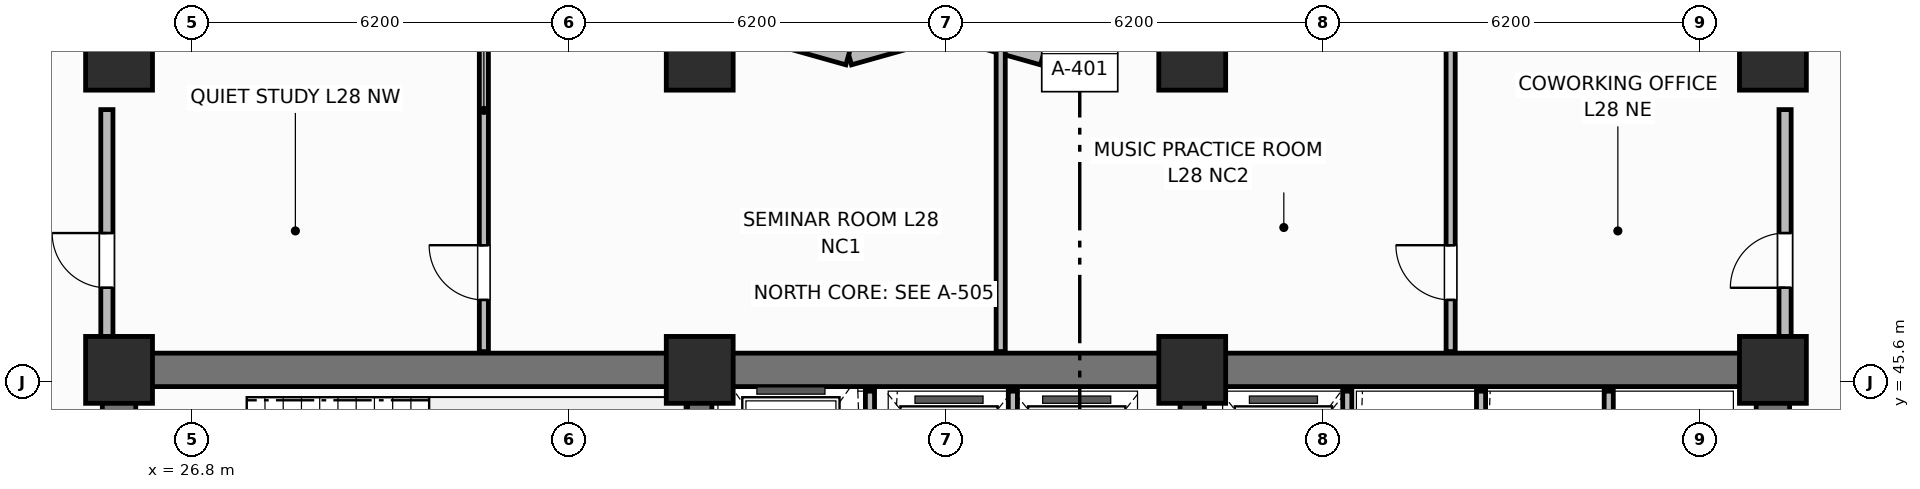
"""IFC4 building model, lengths in metres.
Left out: names, types, materials, properties, quantities, classifications, styles, units other than length and angle.
Written with IfcOpenShell. Run it as: python <this file> out.ifc"""

import sys

from ifc_helpers import new_model, si_unit, direction, frame, frame_2d, origin, origin_2d, place, context, subcontext, project, spatial, rectangle, extrude, element, fill, save


model = new_model("IFC4")
c1 = context("Model", 3, precision=1e-05, world=origin(), true_north=direction((0.0, 1.0)))
c2 = subcontext(c1, "Body", "Model", "MODEL_VIEW")
j1 = project(units=[si_unit("LENGTHUNIT", "METRE"), si_unit("PLANEANGLEUNIT", "RADIAN")], contexts=[c1])
p1 = place(None, origin())
s1 = spatial("IfcSite", under=j1, at=p1, CompositionType="ELEMENT")
p2 = place(p1, origin())
s2 = spatial("IfcBuilding", under=s1, at=p2, CompositionType="ELEMENT")
p3 = place(p2, frame((0.0, 0.0, 114.2)))
s3 = spatial("IfcBuildingStorey", under=s2, at=p3, CompositionType="ELEMENT", Elevation=114.2)
p4 = place(p3, frame((25.6, 45.8, 0.0), z_axis=(0.0, 0.0, 1.0), x_axis=(1.0, 0.0, 0.0)))
e1 = element("IfcWall", 1, at=p4, inside=s3, PredefinedType="SHEAR", context=c2, shape_type="SweptSolid", body=[
    extrude(rectangle(XDim=27.2, YDim=0.55, at=frame_2d((13.6, 0.0))), origin(), (0.0, 0.0, 1.0), 3.7),
])
for number, where, z_axis, x_axis in (
    (2, (25.6, 39.875, 0.0), (0.0, 0.0, 1.0), (0.0, 1.0, 0.0)),
    (3, (52.8, 39.875, 0.0), (0.0, 0.0, 1.0), (0.0, 1.0, 0.0)),
):
    element("IfcWall", number, at=place(p3, frame(where, z_axis=z_axis, x_axis=x_axis)), inside=s3, PredefinedType="SHEAR", context=c2, shape_type="SweptSolid", body=[
        extrude(rectangle(XDim=5.65, YDim=0.55, at=frame_2d((2.825, 0.0))), origin(), (0.0, 0.0, 1.0), 3.7),
    ])
for number, where, z_axis, x_axis in (
    (4, (35.15, 39.875, 0.0), (0.0, 0.0, 1.0), (0.0, 1.0, 0.0)),
    (5, (43.25, 39.875, 0.0), (0.0, 0.0, 1.0), (0.0, 1.0, 0.0)),
):
    element("IfcWall", number, at=place(p3, frame(where, z_axis=z_axis, x_axis=x_axis)), inside=s3, PredefinedType="SHEAR", context=c2, shape_type="SweptSolid", body=[
        extrude(rectangle(XDim=5.65, YDim=0.4, at=frame_2d((2.825, 0.0))), origin(), (0.0, 0.0, 1.0), 3.7),
    ])
for number, where, z_axis, x_axis in (
    (6, (25.6, 45.8, 0.0), (0.0, 0.0, 1.0), (1.0, 0.0, 0.0)),
    (7, (35.15, 45.8, 0.0), (0.0, 0.0, 1.0), (1.0, 0.0, 0.0)),
    (8, (43.25, 45.8, 0.0), (0.0, 0.0, 1.0), (1.0, 0.0, 0.0)),
    (9, (52.8, 45.8, 0.0), (0.0, 0.0, 1.0), (1.0, 0.0, 0.0)),
    (10, (25.6, 50.95, 0.0), (0.0, 0.0, 1.0), (1.0, 0.0, 0.0)),
    (11, (35.15, 50.95, 0.0), (0.0, 0.0, 1.0), (1.0, 0.0, 0.0)),
    (12, (43.25, 50.95, 0.0), (0.0, 0.0, 1.0), (1.0, 0.0, 0.0)),
    (13, (52.8, 50.95, 0.0), (0.0, 0.0, 1.0), (1.0, 0.0, 0.0)),
):
    element("IfcColumn", number, at=place(p3, frame(where, z_axis=z_axis, x_axis=x_axis)), inside=s3, PredefinedType="COLUMN", context=c2, shape_type="SweptSolid", body=[
        extrude(rectangle(XDim=1.1, YDim=1.1, at=origin_2d()), origin(), (0.0, 0.0, 1.0), 3.7),
    ])
p5 = place(p3, frame((42.4, 51.43, 0.0), z_axis=(0.0, 0.0, 1.0), x_axis=(-0.962652136636, -0.270741322725, 0.0)))
e14 = element("IfcWall", 14, at=p5, inside=s3, PredefinedType="SOLIDWALL", context=c2, shape_type="SweptSolid", body=[
    extrude(rectangle(XDim=1.662, YDim=0.34, at=frame_2d((0.831, 0.0))), origin(), (0.0, 0.0, 1.0), 2.7),
])
p6 = place(p3, frame((40.8, 50.98, 0.0), z_axis=(0.0, 0.0, 1.0), x_axis=(-0.962662902433, 0.270703040766, 0.0)))
e15 = element("IfcWall", 15, at=p6, inside=s3, PredefinedType="SOLIDWALL", context=c2, shape_type="SweptSolid", body=[
    extrude(rectangle(XDim=1.662, YDim=0.34, at=frame_2d((0.831, 0.0))), origin(), (0.0, 0.0, 1.0), 2.7),
])
p7 = place(p3, frame((39.2, 51.43, 0.0), z_axis=(0.0, 0.0, 1.0), x_axis=(-0.962652136636, -0.270741322725, 0.0)))
e16 = element("IfcWall", 16, at=p7, inside=s3, PredefinedType="SOLIDWALL", context=c2, shape_type="SweptSolid", body=[
    extrude(rectangle(XDim=1.662, YDim=0.34, at=frame_2d((0.831, 0.0))), origin(), (0.0, 0.0, 1.0), 2.7),
])
p8 = place(p3, frame((37.6, 50.98, 0.0), z_axis=(0.0, 0.0, 1.0), x_axis=(-0.962662902433, 0.270703040766, 0.0)))
e17 = element("IfcWall", 17, at=p8, inside=s3, PredefinedType="SOLIDWALL", context=c2, shape_type="SweptSolid", body=[
    extrude(rectangle(XDim=1.662, YDim=0.34, at=frame_2d((0.831, 0.0))), origin(), (0.0, 0.0, 1.0), 2.7),
])
p9 = place(p3, frame((37.95, 42.6, 0.0), z_axis=(0.0, 0.0, 1.0), x_axis=(0.0, 1.0, 0.0)))
e18 = element("IfcWall", 18, at=p9, inside=s3, PredefinedType="PARTITIONING", context=c2, shape_type="SweptSolid", body=[
    extrude(rectangle(XDim=2.85, YDim=0.15, at=frame_2d((1.425, 0.0))), origin(), (0.0, 0.0, 1.0), 2.53),
])
for number, where, z_axis, x_axis in (
    (19, (40.3, 42.65, 0.0), (0.0, 0.0, 1.0), (0.0, 1.0, 0.0)),
    (20, (45.8, 42.65, 0.0), (0.0, 0.0, 1.0), (0.0, 1.0, 0.0)),
    (21, (48.0, 42.65, 0.0), (0.0, 0.0, 1.0), (0.0, 1.0, 0.0)),
    (22, (50.1, 42.65, 0.0), (0.0, 0.0, 1.0), (0.0, 1.0, 0.0)),
):
    element("IfcWall", number, at=place(p3, frame(where, z_axis=z_axis, x_axis=x_axis)), inside=s3, PredefinedType="PARTITIONING", context=c2, shape_type="SweptSolid", body=[
        extrude(rectangle(XDim=2.8, YDim=0.15, at=frame_2d((1.4, 0.0))), origin(), (0.0, 0.0, 1.0), 2.53),
    ])
p10 = place(p3, frame((31.6, 46.1, 0.0), z_axis=(0.0, 0.0, 1.0), x_axis=(0.0, 1.0, 0.0)))
e23 = element("IfcWall", 23, at=p10, inside=s3, PredefinedType="PARTITIONING", context=c2, shape_type="SweptSolid", body=[
    extrude(rectangle(XDim=5.33, YDim=0.15, at=frame_2d((2.665, 0.0))), origin(), (0.0, 0.0, 1.0), 2.53),
])
p11 = place(p10, frame((0.85, 0.0, 0.0)))
e24 = element("IfcOpeningElement", 24, at=p11, cuts=e23, PredefinedType="OPENING", context=c2, shape_type="SweptSolid", body=[
    extrude(rectangle(XDim=0.9, YDim=2.1, at=frame_2d((0.45, 1.05))), frame((0.0, 0.085, 0.0), z_axis=(0.0, -1.0, 0.0), x_axis=(1.0, 0.0, 0.0)), (0.0, 0.0, 1.0), 0.17),
])
p12 = place(p3, frame((40.1, 46.1, 0.0), z_axis=(0.0, 0.0, 1.0), x_axis=(0.0, 1.0, 0.0)))
e25 = element("IfcWall", 25, at=p12, inside=s3, PredefinedType="PARTITIONING", context=c2, shape_type="SweptSolid", body=[
    extrude(rectangle(XDim=5.33, YDim=0.15, at=frame_2d((2.665, 0.0))), origin(), (0.0, 0.0, 1.0), 2.53),
])
p13 = place(p3, frame((47.5, 46.1, 0.0), z_axis=(0.0, 0.0, 1.0), x_axis=(0.0, 1.0, 0.0)))
e26 = element("IfcWall", 26, at=p13, inside=s3, PredefinedType="PARTITIONING", context=c2, shape_type="SweptSolid", body=[
    extrude(rectangle(XDim=5.33, YDim=0.15, at=frame_2d((2.665, 0.0))), origin(), (0.0, 0.0, 1.0), 2.53),
])
p14 = place(p13, frame((0.85, 0.0, 0.0)))
e27 = element("IfcOpeningElement", 27, at=p14, cuts=e26, PredefinedType="OPENING", context=c2, shape_type="SweptSolid", body=[
    extrude(rectangle(XDim=0.9, YDim=2.1, at=frame_2d((0.45, 1.05))), frame((0.0, 0.085, 0.0), z_axis=(0.0, -1.0, 0.0), x_axis=(1.0, 0.0, 0.0)), (0.0, 0.0, 1.0), 0.17),
])
p15 = place(p3, frame((25.4, 46.1, 0.0), z_axis=(0.0, 0.0, 1.0), x_axis=(0.0, 1.0, 0.0)))
e28 = element("IfcWall", 28, at=p15, inside=s3, PredefinedType="PARTITIONING", context=c2, shape_type="SweptSolid", body=[
    extrude(rectangle(XDim=3.98, YDim=0.2, at=frame_2d((1.99, 0.0))), origin(), (0.0, 0.0, 1.0), 2.53),
])
p16 = place(p15, frame((1.05, 0.0, 0.0)))
e29 = element("IfcOpeningElement", 29, at=p16, cuts=e28, PredefinedType="OPENING", context=c2, shape_type="SweptSolid", body=[
    extrude(rectangle(XDim=0.9, YDim=2.1, at=frame_2d((0.45, 1.05))), frame((0.0, 0.11, 0.0), z_axis=(0.0, -1.0, 0.0), x_axis=(1.0, 0.0, 0.0)), (0.0, 0.0, 1.0), 0.22),
])
p17 = place(p3, frame((53.0, 46.1, 0.0), z_axis=(0.0, 0.0, 1.0), x_axis=(0.0, 1.0, 0.0)))
e30 = element("IfcWall", 30, at=p17, inside=s3, PredefinedType="PARTITIONING", context=c2, shape_type="SweptSolid", body=[
    extrude(rectangle(XDim=3.98, YDim=0.2, at=frame_2d((1.99, 0.0))), origin(), (0.0, 0.0, 1.0), 2.53),
])
p18 = place(p17, frame((1.05, 0.0, 0.0)))
e31 = element("IfcOpeningElement", 31, at=p18, cuts=e30, PredefinedType="OPENING", context=c2, shape_type="SweptSolid", body=[
    extrude(rectangle(XDim=0.9, YDim=2.1, at=frame_2d((0.45, 1.05))), frame((0.0, 0.11, 0.0), z_axis=(0.0, -1.0, 0.0), x_axis=(1.0, 0.0, 0.0)), (0.0, 0.0, 1.0), 0.22),
])
p19 = place(p11, origin())
e32 = element("IfcDoor", 32, at=p19, inside=s3, OperationType="SINGLE_SWING_RIGHT", PredefinedType="DOOR", context=c2, shape_type="SweptSolid", body=[
    extrude(rectangle(XDim=0.9, YDim=2.1, at=frame_2d((0.45, 1.05))), frame((0.0, 0.025, 0.0), z_axis=(0.0, -1.0, 0.0), x_axis=(1.0, 0.0, 0.0)), (0.0, 0.0, 1.0), 0.05),
])
fill(e24, e32)
p20 = place(p14, origin())
e33 = element("IfcDoor", 33, at=p20, inside=s3, OperationType="SINGLE_SWING_RIGHT", PredefinedType="DOOR", context=c2, shape_type="SweptSolid", body=[
    extrude(rectangle(XDim=0.9, YDim=2.1, at=frame_2d((0.45, 1.05))), frame((0.0, 0.025, 0.0), z_axis=(0.0, -1.0, 0.0), x_axis=(1.0, 0.0, 0.0)), (0.0, 0.0, 1.0), 0.05),
])
fill(e27, e33)
p21 = place(p16, origin())
e34 = element("IfcDoor", 34, at=p21, inside=s3, OperationType="SINGLE_SWING_RIGHT", PredefinedType="DOOR", context=c2, shape_type="SweptSolid", body=[
    extrude(rectangle(XDim=0.9, YDim=2.1, at=frame_2d((0.45, 1.05))), frame((0.0, 0.025, 0.0), z_axis=(0.0, -1.0, 0.0), x_axis=(1.0, 0.0, 0.0)), (0.0, 0.0, 1.0), 0.05),
])
fill(e29, e34)
p22 = place(p18, origin())
e35 = element("IfcDoor", 35, at=p22, inside=s3, OperationType="SINGLE_SWING_LEFT", PredefinedType="DOOR", context=c2, shape_type="SweptSolid", body=[
    extrude(rectangle(XDim=0.9, YDim=2.1, at=frame_2d((0.45, 1.05))), frame((0.0, 0.025, 0.0), z_axis=(0.0, -1.0, 0.0), x_axis=(1.0, 0.0, 0.0)), (0.0, 0.0, 1.0), 0.05),
])
fill(e31, e35)
save(model, sys.argv[1])
